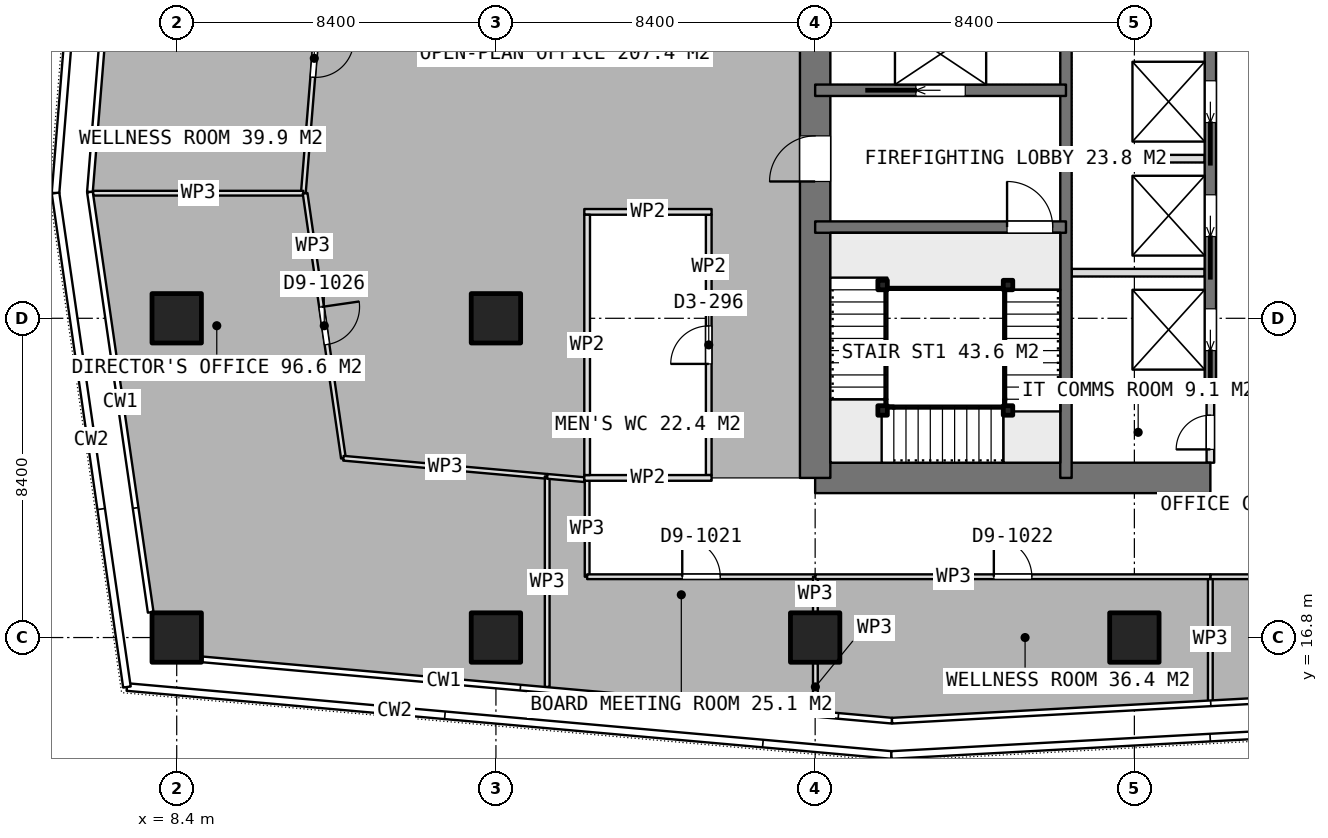
"""IFC4 building model, lengths in metres.
Left out: names, types, materials, properties, quantities, classifications, styles, units other than length and angle.
Written with IfcOpenShell. Run it as: python <this file> out.ifc"""

import sys

from ifc_helpers import new_model, si_unit, direction, frame, frame_2d, origin, origin_2d, place, context, subcontext, project, spatial, rectangle, extrude, element, fill, save


model = new_model("IFC4")
c1 = context("Model", 3, precision=1e-05, world=origin(), true_north=direction((0.0, 1.0)))
c2 = subcontext(c1, "Body", "Model", "MODEL_VIEW")
j1 = project(units=[si_unit("LENGTHUNIT", "METRE"), si_unit("PLANEANGLEUNIT", "RADIAN")], contexts=[c1])
p1 = place(None, origin())
s1 = spatial("IfcSite", under=j1, at=p1, CompositionType="ELEMENT")
p2 = place(p1, origin())
s2 = spatial("IfcBuilding", under=s1, at=p2, CompositionType="ELEMENT")
p3 = place(p2, frame((0.0, 0.0, 276.35)))
s3 = spatial("IfcBuildingStorey", under=s2, at=p3, CompositionType="ELEMENT", Elevation=276.35)
p4 = place(p3, frame((25.2, 21.0, 0.0), z_axis=(0.0, 0.0, 1.0), x_axis=(1.0, 0.0, 0.0)))
e1 = element("IfcWall", 1, at=p4, inside=s3, PredefinedType="SHEAR", context=c2, shape_type="SweptSolid", body=[
    extrude(rectangle(XDim=10.4, YDim=0.8, at=frame_2d((5.2, 0.0))), origin(), (0.0, 0.0, 1.0), 3.75),
])
p5 = place(p3, frame((25.2, 21.0, 0.0), z_axis=(0.0, 0.0, 1.0), x_axis=(0.0, 1.0, 0.0)))
e2 = element("IfcWall", 2, at=p5, inside=s3, PredefinedType="SHEAR", context=c2, shape_type="SweptSolid", body=[
    extrude(rectangle(XDim=25.2, YDim=0.8, at=frame_2d((12.6, 0.0))), origin(), (0.0, 0.0, 1.0), 3.75),
])
p6 = place(p5, frame((7.8, 0.0, 0.0)))
e3 = element("IfcOpeningElement", 3, at=p6, cuts=e2, PredefinedType="OPENING", context=c2, shape_type="SweptSolid", body=[
    extrude(rectangle(XDim=1.2, YDim=2.1, at=frame_2d((0.6, 1.05))), frame((0.0, 0.41, 0.0), z_axis=(0.0, -1.0, 0.0), x_axis=(1.0, 0.0, 0.0)), (0.0, 0.0, 1.0), 0.82),
])
p7 = place(p5, frame((14.25, 0.0, 0.0)))
e4 = element("IfcOpeningElement", 4, at=p7, cuts=e2, PredefinedType="OPENING", context=c2, shape_type="SweptSolid", body=[
    extrude(rectangle(XDim=0.9, YDim=2.1, at=frame_2d((0.45, 1.05))), frame((0.0, 0.41, 0.0), z_axis=(0.0, -1.0, 0.0), x_axis=(1.0, 0.0, 0.0)), (0.0, 0.0, 1.0), 0.82),
])
p8 = place(p5, frame((16.85, 0.0, 0.0)))
e5 = element("IfcOpeningElement", 5, at=p8, cuts=e2, PredefinedType="OPENING", context=c2, shape_type="SweptSolid", body=[
    extrude(rectangle(XDim=0.9, YDim=2.1, at=frame_2d((0.45, 1.05))), frame((0.0, 0.41, 0.0), z_axis=(0.0, -1.0, 0.0), x_axis=(1.0, 0.0, 0.0)), (0.0, 0.0, 1.0), 0.82),
])
p9 = place(p5, frame((18.95, 0.0, 0.0)))
e6 = element("IfcOpeningElement", 6, at=p9, cuts=e2, PredefinedType="OPENING", context=c2, shape_type="SweptSolid", body=[
    extrude(rectangle(XDim=1.2, YDim=2.1, at=frame_2d((0.6, 1.05))), frame((0.0, 0.41, 0.0), z_axis=(0.0, -1.0, 0.0), x_axis=(1.0, 0.0, 0.0)), (0.0, 0.0, 1.0), 0.82),
])
p10 = place(p3, frame((31.8, 21.0, 0.0), z_axis=(0.0, 0.0, 1.0), x_axis=(0.0, 1.0, 0.0)))
e7 = element("IfcWall", 7, at=p10, inside=s3, PredefinedType="SHEAR", context=c2, shape_type="SweptSolid", body=[
    extrude(rectangle(XDim=25.2, YDim=0.3, at=frame_2d((12.6, 0.0))), origin(), (0.0, 0.0, 1.0), 3.75),
])
p11 = place(p3, frame((35.6, 23.4, 0.0), z_axis=(0.0, 0.0, 1.0), x_axis=(0.0, 1.0, 0.0)))
e8 = element("IfcWall", 8, at=p11, inside=s3, PredefinedType="SHEAR", context=c2, shape_type="SweptSolid", body=[
    extrude(rectangle(XDim=18.0, YDim=0.3, at=frame_2d((9.0, 0.0))), origin(), (0.0, 0.0, 1.0), 3.75),
])
p12 = place(p11, frame((0.95, 0.0, 0.0)))
e9 = element("IfcOpeningElement", 9, at=p12, cuts=e8, PredefinedType="OPENING", context=c2, shape_type="SweptSolid", body=[
    extrude(rectangle(XDim=1.1, YDim=2.1, at=frame_2d((0.55, 1.05))), frame((0.0, 0.16, 0.0), z_axis=(0.0, -1.0, 0.0), x_axis=(1.0, 0.0, 0.0)), (0.0, 0.0, 1.0), 0.32),
])
p13 = place(p11, frame((3.95, 0.0, 0.0)))
e10 = element("IfcOpeningElement", 10, at=p13, cuts=e8, PredefinedType="OPENING", context=c2, shape_type="SweptSolid", body=[
    extrude(rectangle(XDim=1.1, YDim=2.1, at=frame_2d((0.55, 1.05))), frame((0.0, 0.16, 0.0), z_axis=(0.0, -1.0, 0.0), x_axis=(1.0, 0.0, 0.0)), (0.0, 0.0, 1.0), 0.32),
])
p14 = place(p11, frame((6.95, 0.0, 0.0)))
e11 = element("IfcOpeningElement", 11, at=p14, cuts=e8, PredefinedType="OPENING", context=c2, shape_type="SweptSolid", body=[
    extrude(rectangle(XDim=1.1, YDim=2.1, at=frame_2d((0.55, 1.05))), frame((0.0, 0.16, 0.0), z_axis=(0.0, -1.0, 0.0), x_axis=(1.0, 0.0, 0.0)), (0.0, 0.0, 1.0), 0.32),
])
p15 = place(p11, frame((9.95, 0.0, 0.0)))
e12 = element("IfcOpeningElement", 12, at=p15, cuts=e8, PredefinedType="OPENING", context=c2, shape_type="SweptSolid", body=[
    extrude(rectangle(XDim=1.1, YDim=2.1, at=frame_2d((0.55, 1.05))), frame((0.0, 0.16, 0.0), z_axis=(0.0, -1.0, 0.0), x_axis=(1.0, 0.0, 0.0)), (0.0, 0.0, 1.0), 0.32),
])
p16 = place(p11, frame((12.95, 0.0, 0.0)))
e13 = element("IfcOpeningElement", 13, at=p16, cuts=e8, PredefinedType="OPENING", context=c2, shape_type="SweptSolid", body=[
    extrude(rectangle(XDim=1.1, YDim=2.1, at=frame_2d((0.55, 1.05))), frame((0.0, 0.16, 0.0), z_axis=(0.0, -1.0, 0.0), x_axis=(1.0, 0.0, 0.0)), (0.0, 0.0, 1.0), 0.32),
])
p17 = place(p11, frame((15.95, 0.0, 0.0)))
e14 = element("IfcOpeningElement", 14, at=p17, cuts=e8, PredefinedType="OPENING", context=c2, shape_type="SweptSolid", body=[
    extrude(rectangle(XDim=1.1, YDim=2.1, at=frame_2d((0.55, 1.05))), frame((0.0, 0.16, 0.0), z_axis=(0.0, -1.0, 0.0), x_axis=(1.0, 0.0, 0.0)), (0.0, 0.0, 1.0), 0.32),
])
p18 = place(p3, frame((31.8, 23.4, 0.0), z_axis=(0.0, 0.0, 1.0), x_axis=(1.0, 0.0, 0.0)))
e15 = element("IfcWall", 15, at=p18, inside=s3, PredefinedType="SHEAR", context=c2, shape_type="SweptSolid", body=[
    extrude(rectangle(XDim=3.8, YDim=0.3, at=frame_2d((1.9, 0.0))), origin(), (0.0, 0.0, 1.0), 3.75),
])
p19 = place(p3, frame((25.2, 27.6, 0.0), z_axis=(0.0, 0.0, 1.0), x_axis=(1.0, 0.0, 0.0)))
e16 = element("IfcWall", 16, at=p19, inside=s3, PredefinedType="SHEAR", context=c2, shape_type="SweptSolid", body=[
    extrude(rectangle(XDim=6.6, YDim=0.3, at=frame_2d((3.3, 0.0))), origin(), (0.0, 0.0, 1.0), 3.75),
])
p20 = place(p19, frame((5.05, 0.0, 0.0)))
e17 = element("IfcOpeningElement", 17, at=p20, cuts=e16, PredefinedType="OPENING", context=c2, shape_type="SweptSolid", body=[
    extrude(rectangle(XDim=1.2, YDim=2.1, at=frame_2d((0.6, 1.05))), frame((0.0, 0.16, 0.0), z_axis=(0.0, -1.0, 0.0), x_axis=(1.0, 0.0, 0.0)), (0.0, 0.0, 1.0), 0.32),
])
p21 = place(p3, frame((25.2, 31.2, 0.0), z_axis=(0.0, 0.0, 1.0), x_axis=(1.0, 0.0, 0.0)))
e18 = element("IfcWall", 18, at=p21, inside=s3, PredefinedType="SHEAR", context=c2, shape_type="SweptSolid", body=[
    extrude(rectangle(XDim=6.6, YDim=0.3, at=frame_2d((3.3, 0.0))), origin(), (0.0, 0.0, 1.0), 3.75),
])
p22 = place(p21, frame((2.65, 0.0, 0.0)))
e19 = element("IfcOpeningElement", 19, at=p22, cuts=e18, PredefinedType="OPENING", context=c2, shape_type="SweptSolid", body=[
    extrude(rectangle(XDim=1.3, YDim=2.1, at=frame_2d((0.65, 1.05))), frame((0.0, 0.16, 0.0), z_axis=(0.0, -1.0, 0.0), x_axis=(1.0, 0.0, 0.0)), (0.0, 0.0, 1.0), 0.32),
])
for number, where, z_axis, x_axis in (
    (20, (8.4, 16.8, 0.0), (0.0, 0.0, 1.0), (1.0, 0.0, 0.0)),
    (21, (8.4, 25.2, 0.0), (0.0, 0.0, 1.0), (1.0, 0.0, 0.0)),
    (22, (16.8, 16.8, 0.0), (0.0, 0.0, 1.0), (1.0, 0.0, 0.0)),
    (23, (16.8, 25.2, 0.0), (0.0, 0.0, 1.0), (1.0, 0.0, 0.0)),
    (24, (25.2, 16.8, 0.0), (0.0, 0.0, 1.0), (1.0, 0.0, 0.0)),
    (25, (33.6, 16.8, 0.0), (0.0, 0.0, 1.0), (1.0, 0.0, 0.0)),
):
    element("IfcColumn", number, at=place(p3, frame(where, z_axis=z_axis, x_axis=x_axis)), inside=s3, PredefinedType="COLUMN", context=c2, shape_type="SweptSolid", body=[
        extrude(rectangle(XDim=1.3, YDim=1.3, at=origin_2d()), origin(), (0.0, 0.0, 1.0), 3.75),
    ])
for number, where, z_axis, x_axis in (
    (26, (31.95, 26.4, 0.0), (0.0, 0.0, 1.0), (1.0, 0.0, 0.0)),
    (27, (31.95, 29.4, 0.0), (0.0, 0.0, 1.0), (1.0, 0.0, 0.0)),
):
    element("IfcWall", number, at=place(p3, frame(where, z_axis=z_axis, x_axis=x_axis)), inside=s3, PredefinedType="PARTITIONING", context=c2, shape_type="SweptSolid", body=[
        extrude(rectangle(XDim=3.5, YDim=0.2, at=frame_2d((1.75, 0.0))), origin(), (0.0, 0.0, 1.0), 3.5),
    ])
p23 = place(p3, frame((35.6, 21.4, 0.0), z_axis=(0.0, 0.0, 1.0), x_axis=(0.0, 1.0, 0.0)))
e28 = element("IfcWall", 28, at=p23, inside=s3, PredefinedType="PARTITIONING", context=c2, shape_type="SweptSolid", body=[
    extrude(rectangle(XDim=1.85, YDim=0.2, at=frame_2d((0.925, 0.0))), origin(), (0.0, 0.0, 1.0), 3.5),
])
p24 = place(p23, frame((0.35, 0.0, 0.0)))
e29 = element("IfcOpeningElement", 29, at=p24, cuts=e28, PredefinedType="OPENING", context=c2, shape_type="SweptSolid", body=[
    extrude(rectangle(XDim=0.9, YDim=2.1, at=frame_2d((0.45, 1.05))), frame((0.0, 0.11, 0.0), z_axis=(0.0, -1.0, 0.0), x_axis=(1.0, 0.0, 0.0)), (0.0, 0.0, 1.0), 0.22),
])
for number, where, z_axis, x_axis in (
    (30, (19.125, 21.0, 0.0), (0.0, 0.0, 1.0), (1.0, 0.0, 0.0)),
    (31, (19.125, 28.0, 0.0), (0.0, 0.0, 1.0), (1.0, 0.0, 0.0)),
):
    element("IfcWall", number, at=place(p3, frame(where, z_axis=z_axis, x_axis=x_axis)), inside=s3, PredefinedType="PARTITIONING", context=c2, shape_type="SweptSolid", body=[
        extrude(rectangle(XDim=3.35, YDim=0.15, at=frame_2d((1.675, 0.0))), origin(), (0.0, 0.0, 1.0), 3.5),
    ])
p25 = place(p3, frame((19.2, 21.075, 0.0), z_axis=(0.0, 0.0, 1.0), x_axis=(0.0, 1.0, 0.0)))
e32 = element("IfcWall", 32, at=p25, inside=s3, PredefinedType="PARTITIONING", context=c2, shape_type="SweptSolid", body=[
    extrude(rectangle(XDim=6.85, YDim=0.15, at=frame_2d((3.425, 0.0))), origin(), (0.0, 0.0, 1.0), 3.5),
])
p26 = place(p3, frame((22.4, 21.075, 0.0), z_axis=(0.0, 0.0, 1.0), x_axis=(0.0, 1.0, 0.0)))
e33 = element("IfcWall", 33, at=p26, inside=s3, PredefinedType="PARTITIONING", context=c2, shape_type="SweptSolid", body=[
    extrude(rectangle(XDim=6.85, YDim=0.15, at=frame_2d((3.425, 0.0))), origin(), (0.0, 0.0, 1.0), 3.5),
])
p27 = place(p26, frame((2.925, 0.0, 0.0)))
e34 = element("IfcOpeningElement", 34, at=p27, cuts=e33, PredefinedType="OPENING", context=c2, shape_type="SweptSolid", body=[
    extrude(rectangle(XDim=1.0, YDim=2.1, at=frame_2d((0.5, 1.05))), frame((0.0, 0.085, 0.0), z_axis=(0.0, -1.0, 0.0), x_axis=(1.0, 0.0, 0.0)), (0.0, 0.0, 1.0), 0.17),
])
p28 = place(p3, frame((35.599, 15.119, 0.0), z_axis=(0.0, 0.0, 1.0), x_axis=(0.0, 1.0, 0.0)))
e35 = element("IfcWall", 35, at=p28, inside=s3, PredefinedType="PARTITIONING", context=c2, shape_type="SweptSolid", body=[
    extrude(rectangle(XDim=3.281, YDim=0.125, at=frame_2d((1.641, 0.0))), origin(), (0.0, 0.0, 1.0), 3.5),
])
p29 = place(p3, frame((35.599, 18.4, 0.0), z_axis=(0.0, 0.0, 1.0), x_axis=(1.0, 0.0, 0.0)))
e36 = element("IfcWall", 36, at=p29, inside=s3, PredefinedType="PARTITIONING", context=c2, shape_type="SweptSolid", body=[
    extrude(rectangle(XDim=7.074, YDim=0.125, at=frame_2d((3.537, 0.0))), origin(), (0.0, 0.0, 1.0), 3.5),
])
p30 = place(p29, frame((3.037, 0.0, 0.0)))
e37 = element("IfcOpeningElement", 37, at=p30, cuts=e36, PredefinedType="OPENING", context=c2, shape_type="SweptSolid", body=[
    extrude(rectangle(XDim=1.0, YDim=2.1, at=frame_2d((0.5, 1.05))), frame((0.0, 0.073, 0.0), z_axis=(0.0, -1.0, 0.0), x_axis=(1.0, 0.0, 0.0)), (0.0, 0.0, 1.0), 0.145),
])
p31 = place(p3, frame((12.309, 35.589, 0.0), z_axis=(0.0, 0.0, 1.0), x_axis=(-0.081053384124, -0.996709761627, 0.0)))
e38 = element("IfcWall", 38, at=p31, inside=s3, PredefinedType="PARTITIONING", context=c2, shape_type="SweptSolid", body=[
    extrude(rectangle(XDim=7.121, YDim=0.125, at=frame_2d((3.56, 0.0))), origin(), (0.0, 0.0, 1.0), 3.5),
])
p32 = place(p31, frame((3.06, 0.0, 0.0)))
e39 = element("IfcOpeningElement", 39, at=p32, cuts=e38, PredefinedType="OPENING", context=c2, shape_type="SweptSolid", body=[
    extrude(rectangle(XDim=1.0, YDim=2.1, at=frame_2d((0.5, 1.05))), frame((0.0, 0.073, 0.0), z_axis=(0.0, -1.0, 0.0), x_axis=(1.0, 0.0, 0.0)), (0.0, 0.0, 1.0), 0.145),
])
p33 = place(p3, frame((11.732, 28.492, 0.0), z_axis=(0.0, 0.0, 1.0), x_axis=(-1.0, 0.0, 0.0)))
e40 = element("IfcWall", 40, at=p33, inside=s3, PredefinedType="PARTITIONING", context=c2, shape_type="SweptSolid", body=[
    extrude(rectangle(XDim=5.531, YDim=0.125, at=frame_2d((2.766, 0.0))), origin(), (0.0, 0.0, 1.0), 3.5),
])
p34 = place(p3, frame((11.779, 28.488, 0.0), z_axis=(0.0, 0.0, 1.0), x_axis=(0.143139230014, -0.989702561799, 0.0)))
e41 = element("IfcWall", 41, at=p34, inside=s3, PredefinedType="PARTITIONING", context=c2, shape_type="SweptSolid", body=[
    extrude(rectangle(XDim=7.042, YDim=0.125, at=frame_2d((3.521, 0.0))), origin(), (0.0, 0.0, 1.0), 3.5),
])
p35 = place(p34, frame((3.02, 0.0, 0.0)))
e42 = element("IfcOpeningElement", 42, at=p35, cuts=e41, PredefinedType="OPENING", context=c2, shape_type="SweptSolid", body=[
    extrude(rectangle(XDim=1.0, YDim=2.1, at=frame_2d((0.5, 1.05))), frame((0.0, 0.073, 0.0), z_axis=(0.0, -1.0, 0.0), x_axis=(1.0, 0.0, 0.0)), (0.0, 0.0, 1.0), 0.145),
])
p36 = place(p3, frame((12.787, 21.518, 0.0), z_axis=(0.0, 0.0, 1.0), x_axis=(0.996065348673, -0.088621787237, 0.0)))
e43 = element("IfcWall", 43, at=p36, inside=s3, PredefinedType="PARTITIONING", context=c2, shape_type="SweptSolid", body=[
    extrude(rectangle(XDim=5.383, YDim=0.125, at=frame_2d((2.691, 0.0))), origin(), (0.0, 0.0, 1.0), 3.5),
])
p37 = place(p3, frame((18.149, 21.041, 0.0), z_axis=(0.0, 0.0, 1.0), x_axis=(0.0, -1.0, 0.0)))
e44 = element("IfcWall", 44, at=p37, inside=s3, PredefinedType="PARTITIONING", context=c2, shape_type="SweptSolid", body=[
    extrude(rectangle(XDim=5.541, YDim=0.125, at=frame_2d((2.771, 0.0))), origin(), (0.0, 0.0, 1.0), 3.5),
])
p38 = place(p3, frame((18.15, 21.041, 0.0), z_axis=(0.0, 0.0, 1.0), x_axis=(0.996138836376, -0.087791905459, 0.0)))
e45 = element("IfcWall", 45, at=p38, inside=s3, PredefinedType="PARTITIONING", context=c2, shape_type="SweptSolid", body=[
    extrude(rectangle(XDim=0.979, YDim=0.125, at=frame_2d((0.489, 0.0))), origin(), (0.0, 0.0, 1.0), 3.5),
])
p39 = place(p3, frame((19.2, 20.925, 0.0), z_axis=(0.0, 0.0, 1.0), x_axis=(0.0, -1.0, 0.0)))
e46 = element("IfcWall", 46, at=p39, inside=s3, PredefinedType="PARTITIONING", context=c2, shape_type="SweptSolid", body=[
    extrude(rectangle(XDim=2.525, YDim=0.125, at=frame_2d((1.263, 0.0))), origin(), (0.0, 0.0, 1.0), 3.5),
])
p40 = place(p3, frame((19.2, 18.4, 0.0), z_axis=(0.0, 0.0, 1.0), x_axis=(1.0, 0.0, 0.0)))
e47 = element("IfcWall", 47, at=p40, inside=s3, PredefinedType="PARTITIONING", context=c2, shape_type="SweptSolid", body=[
    extrude(rectangle(XDim=6.006, YDim=0.125, at=frame_2d((3.003, 0.0))), origin(), (0.0, 0.0, 1.0), 3.5),
])
p41 = place(p40, frame((2.503, 0.0, 0.0)))
e48 = element("IfcOpeningElement", 48, at=p41, cuts=e47, PredefinedType="OPENING", context=c2, shape_type="SweptSolid", body=[
    extrude(rectangle(XDim=1.0, YDim=2.1, at=frame_2d((0.5, 1.05))), frame((0.0, 0.073, 0.0), z_axis=(0.0, -1.0, 0.0), x_axis=(1.0, 0.0, 0.0)), (0.0, 0.0, 1.0), 0.145),
])
p42 = place(p3, frame((25.206, 18.4, 0.0), z_axis=(0.0, 0.0, 1.0), x_axis=(0.0, -1.0, 0.0)))
e49 = element("IfcWall", 49, at=p42, inside=s3, PredefinedType="PARTITIONING", context=c2, shape_type="SweptSolid", body=[
    extrude(rectangle(XDim=0.93, YDim=0.125, at=frame_2d((0.465, 0.0))), origin(), (0.0, 0.0, 1.0), 3.5),
])
p43 = place(p3, frame((25.206, 16.13, 0.0), z_axis=(0.0, 0.0, 1.0), x_axis=(0.0, -1.0, 0.0)))
e50 = element("IfcWall", 50, at=p43, inside=s3, PredefinedType="PARTITIONING", context=c2, shape_type="SweptSolid", body=[
    extrude(rectangle(XDim=1.258, YDim=0.125, at=frame_2d((0.629, 0.0))), origin(), (0.0, 0.0, 1.0), 3.5),
])
p44 = place(p3, frame((25.207, 18.4, 0.0), z_axis=(0.0, 0.0, 1.0), x_axis=(1.0, 0.0, 0.0)))
e51 = element("IfcWall", 51, at=p44, inside=s3, PredefinedType="PARTITIONING", context=c2, shape_type="SweptSolid", body=[
    extrude(rectangle(XDim=10.391, YDim=0.125, at=frame_2d((5.195, 0.0))), origin(), (0.0, 0.0, 1.0), 3.5),
])
p45 = place(p44, frame((4.695, 0.0, 0.0)))
e52 = element("IfcOpeningElement", 52, at=p45, cuts=e51, PredefinedType="OPENING", context=c2, shape_type="SweptSolid", body=[
    extrude(rectangle(XDim=1.0, YDim=2.1, at=frame_2d((0.5, 1.05))), frame((0.0, 0.073, 0.0), z_axis=(0.0, -1.0, 0.0), x_axis=(1.0, 0.0, 0.0)), (0.0, 0.0, 1.0), 0.145),
])
for number, where, z_axis, x_axis in (
    (53, (30.275, 26.075, 0.0), (0.0, 0.0, 1.0), (1.0, 0.0, 0.0)),
    (54, (30.275, 22.775, 0.0), (0.0, 0.0, 1.0), (1.0, 0.0, 0.0)),
    (55, (26.975, 22.775, 0.0), (0.0, 0.0, 1.0), (1.0, 0.0, 0.0)),
    (56, (26.975, 26.075, 0.0), (0.0, 0.0, 1.0), (1.0, 0.0, 0.0)),
):
    element("IfcColumn", number, at=place(p3, frame(where, z_axis=z_axis, x_axis=x_axis)), inside=s3, PredefinedType="COLUMN", context=c2, shape_type="SweptSolid", body=[
        extrude(rectangle(XDim=0.25, YDim=0.25, at=origin_2d()), origin(), (0.0, 0.0, 1.0), 3.75),
    ])
p46 = place(p6, origin())
e57 = element("IfcDoor", 57, at=p46, inside=s3, OperationType="SINGLE_SWING_LEFT", PredefinedType="DOOR", context=c2, shape_type="SweptSolid", body=[
    extrude(rectangle(XDim=1.2, YDim=2.1, at=frame_2d((0.6, 1.05))), frame((0.0, 0.025, 0.0), z_axis=(0.0, -1.0, 0.0), x_axis=(1.0, 0.0, 0.0)), (0.0, 0.0, 1.0), 0.05),
])
fill(e3, e57)
p47 = place(p24, origin())
e58 = element("IfcDoor", 58, at=p47, inside=s3, OperationType="SINGLE_SWING_LEFT", PredefinedType="DOOR", context=c2, shape_type="SweptSolid", body=[
    extrude(rectangle(XDim=0.9, YDim=2.1, at=frame_2d((0.45, 1.05))), frame((0.0, 0.025, 0.0), z_axis=(0.0, -1.0, 0.0), x_axis=(1.0, 0.0, 0.0)), (0.0, 0.0, 1.0), 0.05),
])
fill(e29, e58)
p48 = place(p12, origin())
e59 = element("IfcDoor", 59, at=p48, inside=s3, OperationType="SLIDING_TO_LEFT", PredefinedType="USERDEFINED", context=c2, shape_type="SweptSolid", body=[
    extrude(rectangle(XDim=1.1, YDim=2.1, at=frame_2d((0.55, 1.05))), frame((0.0, 0.025, 0.0), z_axis=(0.0, -1.0, 0.0), x_axis=(1.0, 0.0, 0.0)), (0.0, 0.0, 1.0), 0.05),
])
fill(e9, e59)
p49 = place(p13, origin())
e60 = element("IfcDoor", 60, at=p49, inside=s3, OperationType="SLIDING_TO_LEFT", PredefinedType="USERDEFINED", context=c2, shape_type="SweptSolid", body=[
    extrude(rectangle(XDim=1.1, YDim=2.1, at=frame_2d((0.55, 1.05))), frame((0.0, 0.025, 0.0), z_axis=(0.0, -1.0, 0.0), x_axis=(1.0, 0.0, 0.0)), (0.0, 0.0, 1.0), 0.05),
])
fill(e10, e60)
p50 = place(p14, origin())
e61 = element("IfcDoor", 61, at=p50, inside=s3, OperationType="SLIDING_TO_LEFT", PredefinedType="USERDEFINED", context=c2, shape_type="SweptSolid", body=[
    extrude(rectangle(XDim=1.1, YDim=2.1, at=frame_2d((0.55, 1.05))), frame((0.0, 0.025, 0.0), z_axis=(0.0, -1.0, 0.0), x_axis=(1.0, 0.0, 0.0)), (0.0, 0.0, 1.0), 0.05),
])
fill(e11, e61)
p51 = place(p22, origin())
e62 = element("IfcDoor", 62, at=p51, inside=s3, OperationType="SLIDING_TO_LEFT", PredefinedType="USERDEFINED", context=c2, shape_type="SweptSolid", body=[
    extrude(rectangle(XDim=1.3, YDim=2.1, at=frame_2d((0.65, 1.05))), frame((0.0, 0.025, 0.0), z_axis=(0.0, -1.0, 0.0), x_axis=(1.0, 0.0, 0.0)), (0.0, 0.0, 1.0), 0.05),
])
fill(e19, e62)
p52 = place(p27, origin())
e63 = element("IfcDoor", 63, at=p52, inside=s3, OperationType="SINGLE_SWING_LEFT", PredefinedType="DOOR", context=c2, shape_type="SweptSolid", body=[
    extrude(rectangle(XDim=1.0, YDim=2.1, at=frame_2d((0.5, 1.05))), frame((0.0, 0.025, 0.0), z_axis=(0.0, -1.0, 0.0), x_axis=(1.0, 0.0, 0.0)), (0.0, 0.0, 1.0), 0.05),
])
fill(e34, e63)
p53 = place(p32, origin())
e64 = element("IfcDoor", 64, at=p53, inside=s3, OperationType="SINGLE_SWING_LEFT", PredefinedType="DOOR", context=c2, shape_type="SweptSolid", body=[
    extrude(rectangle(XDim=1.0, YDim=2.1, at=frame_2d((0.5, 1.05))), frame((0.0, 0.025, 0.0), z_axis=(0.0, -1.0, 0.0), x_axis=(1.0, 0.0, 0.0)), (0.0, 0.0, 1.0), 0.05),
])
fill(e39, e64)
p54 = place(p35, origin())
e65 = element("IfcDoor", 65, at=p54, inside=s3, OperationType="SINGLE_SWING_LEFT", PredefinedType="DOOR", context=c2, shape_type="SweptSolid", body=[
    extrude(rectangle(XDim=1.0, YDim=2.1, at=frame_2d((0.5, 1.05))), frame((0.0, 0.025, 0.0), z_axis=(0.0, -1.0, 0.0), x_axis=(1.0, 0.0, 0.0)), (0.0, 0.0, 1.0), 0.05),
])
fill(e42, e65)
p55 = place(p41, origin())
e66 = element("IfcDoor", 66, at=p55, inside=s3, OperationType="SINGLE_SWING_LEFT", PredefinedType="DOOR", context=c2, shape_type="SweptSolid", body=[
    extrude(rectangle(XDim=1.0, YDim=2.1, at=frame_2d((0.5, 1.05))), frame((0.0, 0.025, 0.0), z_axis=(0.0, -1.0, 0.0), x_axis=(1.0, 0.0, 0.0)), (0.0, 0.0, 1.0), 0.05),
])
fill(e48, e66)
p56 = place(p45, origin())
e67 = element("IfcDoor", 67, at=p56, inside=s3, OperationType="SINGLE_SWING_LEFT", PredefinedType="DOOR", context=c2, shape_type="SweptSolid", body=[
    extrude(rectangle(XDim=1.0, YDim=2.1, at=frame_2d((0.5, 1.05))), frame((0.0, 0.025, 0.0), z_axis=(0.0, -1.0, 0.0), x_axis=(1.0, 0.0, 0.0)), (0.0, 0.0, 1.0), 0.05),
])
fill(e52, e67)
p57 = place(p20, origin())
e68 = element("IfcDoor", 68, at=p57, inside=s3, OperationType="SINGLE_SWING_RIGHT", PredefinedType="DOOR", context=c2, shape_type="SweptSolid", body=[
    extrude(rectangle(XDim=1.2, YDim=2.1, at=frame_2d((0.6, 1.05))), frame((0.0, 0.025, 0.0), z_axis=(0.0, -1.0, 0.0), x_axis=(1.0, 0.0, 0.0)), (0.0, 0.0, 1.0), 0.05),
])
fill(e17, e68)
save(model, sys.argv[1])
